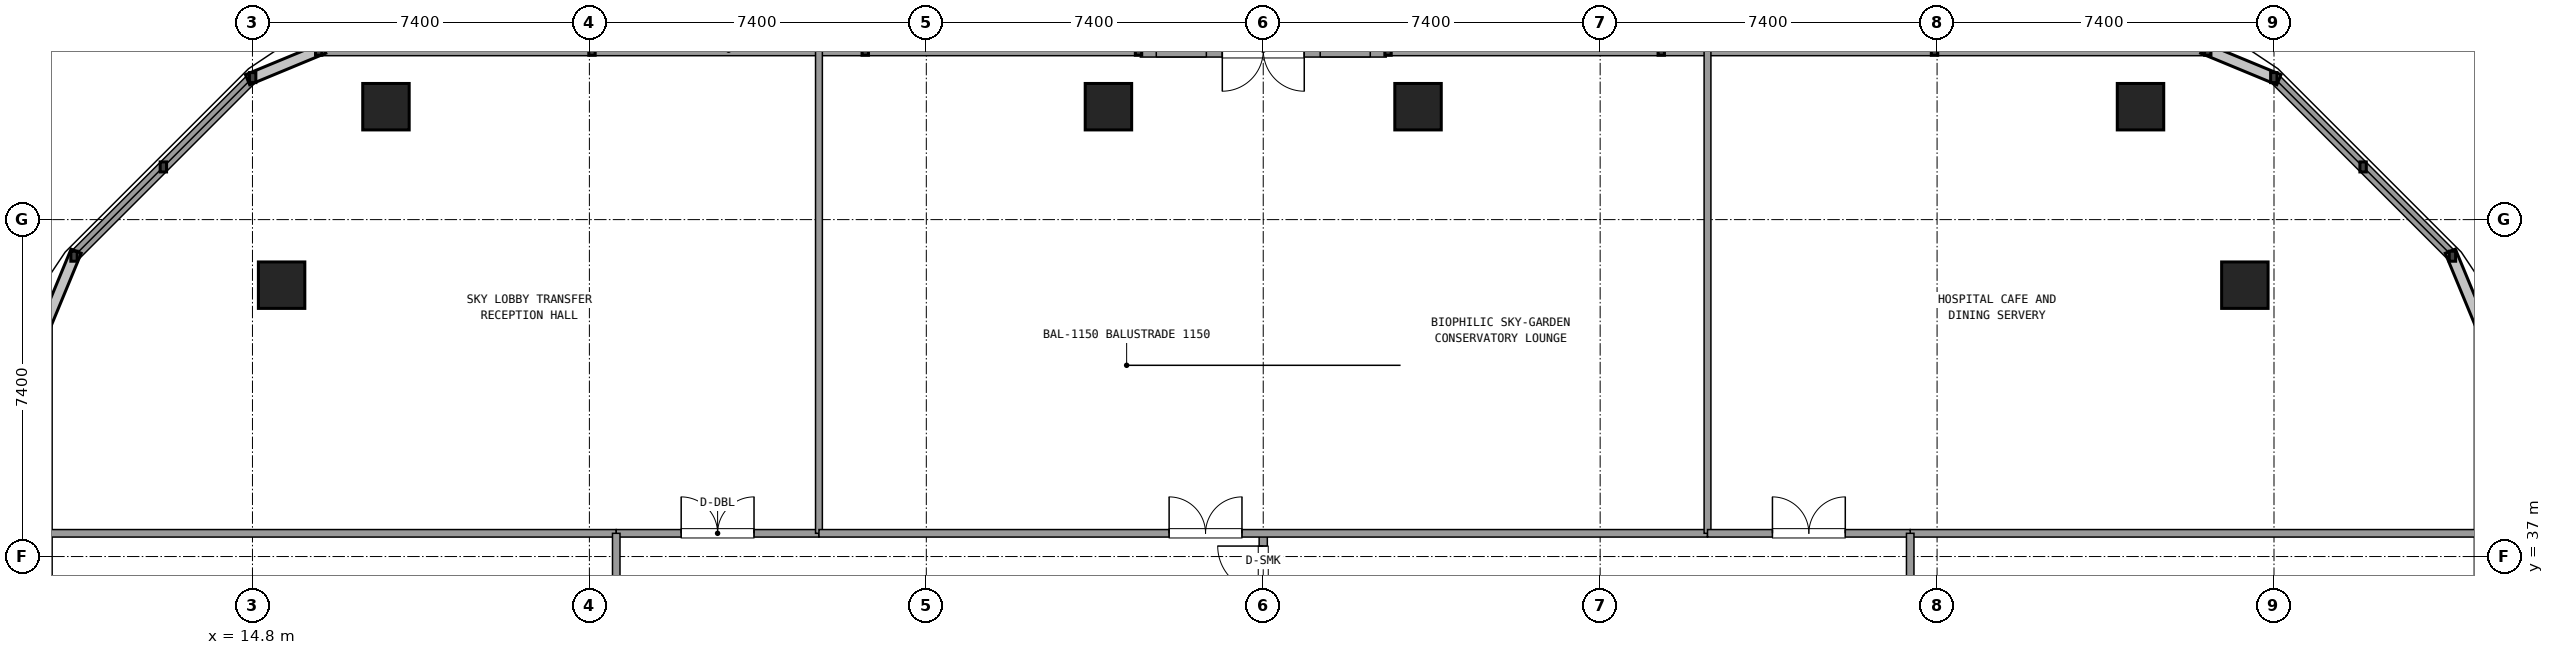
"""IFC4 building model, lengths in metres.
Left out: names, types, materials, properties, quantities, classifications, styles, units other than length and angle.
Written with IfcOpenShell. Run it as: python <this file> out.ifc"""

import sys

from ifc_helpers import new_model, si_unit, direction, frame, frame_2d, origin, origin_2d, place, context, subcontext, project, spatial, rectangle, extrude, element, fill, save


model = new_model("IFC4")
c1 = context("Model", 3, precision=1e-05, world=origin(), true_north=direction((0.0, 1.0)))
c2 = subcontext(c1, "Body", "Model", "MODEL_VIEW")
j1 = project(units=[si_unit("LENGTHUNIT", "METRE"), si_unit("PLANEANGLEUNIT", "RADIAN")], contexts=[c1])
p1 = place(None, origin())
s1 = spatial("IfcSite", under=j1, at=p1, CompositionType="ELEMENT")
p2 = place(p1, origin())
s2 = spatial("IfcBuilding", under=s1, at=p2, CompositionType="ELEMENT")
p3 = place(p2, frame((0.0, 0.0, 75.42)))
s3 = spatial("IfcBuildingStorey", under=s2, at=p3, CompositionType="ELEMENT", Elevation=75.42)
for number, where, z_axis, x_axis in (
    (1, (58.56, 42.96, 0.0), (0.0, 0.0, 1.0), (1.0, 0.0, 0.0)),
    (2, (56.268, 46.88, 0.0), (0.0, 0.0, 1.0), (1.0, 0.0, 0.0)),
    (3, (40.4, 46.88, 0.0), (0.0, 0.0, 1.0), (1.0, 0.0, 0.0)),
    (4, (33.6, 46.88, 0.0), (0.0, 0.0, 1.0), (1.0, 0.0, 0.0)),
    (5, (17.732, 46.88, 0.0), (0.0, 0.0, 1.0), (1.0, 0.0, 0.0)),
    (6, (15.44, 42.96, 0.0), (0.0, 0.0, 1.0), (1.0, 0.0, 0.0)),
):
    element("IfcColumn", number, at=place(p3, frame(where, z_axis=z_axis, x_axis=x_axis)), inside=s3, PredefinedType="COLUMN", context=c2, shape_type="SweptSolid", body=[
        extrude(rectangle(XDim=1.02, YDim=1.02, at=origin_2d()), origin(), (0.0, 0.0, 1.0), 5.76),
    ])
p4 = place(p3, frame((63.72, 28.639, 0.0), z_axis=(0.0, 0.0, 1.0), x_axis=(0.0, 1.0, 0.0)))
e7 = element("IfcWall", 7, at=p4, inside=s3, PredefinedType="SOLIDWALL", context=c2, shape_type="SweptSolid", body=[
    extrude(rectangle(XDim=13.506, YDim=0.24, at=frame_2d((6.753, 0.0))), origin(), (0.0, 0.0, 1.0), 0.85),
])
p5 = place(p3, frame((63.119, 43.596, 0.0), z_axis=(0.0, 0.0, 1.0), x_axis=(-0.707084777957, 0.707128783731, 0.0)))
e8 = element("IfcWall", 8, at=p5, inside=s3, PredefinedType="SOLIDWALL", context=c2, shape_type="SweptSolid", body=[
    extrude(rectangle(XDim=5.548, YDim=0.24, at=frame_2d((2.774, 0.0))), origin(), (0.0, 0.0, 1.0), 0.85),
])
p6 = place(p3, frame((39.701, 48.12, 0.0), z_axis=(0.0, 0.0, 1.0), x_axis=(-1.0, 0.0, 0.0)))
e9 = element("IfcWall", 9, at=p6, inside=s3, PredefinedType="SOLIDWALL", context=c2, shape_type="SweptSolid", body=[
    extrude(rectangle(XDim=5.4, YDim=0.3, at=frame_2d((2.7, 0.0))), origin(), (0.0, 0.0, 1.0), 4.83),
])
p7 = place(p6, frame((1.8, 0.0, 0.0)))
e10 = element("IfcOpeningElement", 10, at=p7, cuts=e9, PredefinedType="OPENING", context=c2, shape_type="SweptSolid", body=[
    extrude(rectangle(XDim=1.8, YDim=2.25, at=frame_2d((0.9, 1.125))), frame((0.0, 0.16, 0.0), z_axis=(0.0, -1.0, 0.0), x_axis=(1.0, 0.0, 0.0)), (0.0, 0.0, 1.0), 0.32),
])
p8 = place(p6, frame((0.35, 0.0, 0.4)))
e11 = element("IfcOpeningElement", 11, at=p8, cuts=e9, PredefinedType="OPENING", context=c2, shape_type="SweptSolid", body=[
    extrude(rectangle(XDim=1.1, YDim=1.8, at=frame_2d((0.55, 0.9))), frame((0.0, 0.16, 0.0), z_axis=(0.0, -1.0, 0.0), x_axis=(1.0, 0.0, 0.0)), (0.0, 0.0, 1.0), 0.32),
])
p9 = place(p6, frame((3.95, 0.0, 0.4)))
e12 = element("IfcOpeningElement", 12, at=p9, cuts=e9, PredefinedType="OPENING", context=c2, shape_type="SweptSolid", body=[
    extrude(rectangle(XDim=1.1, YDim=1.8, at=frame_2d((0.55, 0.9))), frame((0.0, 0.16, 0.0), z_axis=(0.0, -1.0, 0.0), x_axis=(1.0, 0.0, 0.0)), (0.0, 0.0, 1.0), 0.32),
])
p10 = place(p3, frame((57.745, 48.12, 0.0), z_axis=(0.0, 0.0, 1.0), x_axis=(-1.0, 0.0, 0.0)))
e13 = element("IfcWall", 13, at=p10, inside=s3, PredefinedType="SOLIDWALL", context=c2, shape_type="SweptSolid", body=[
    extrude(rectangle(XDim=18.004, YDim=0.24, at=frame_2d((9.002, 0.0))), origin(), (0.0, 0.0, 1.0), 0.85),
])
p11 = place(p3, frame((34.261, 48.12, 0.0), z_axis=(0.0, 0.0, 1.0), x_axis=(-1.0, 0.0, 0.0)))
e14 = element("IfcWall", 14, at=p11, inside=s3, PredefinedType="SOLIDWALL", context=c2, shape_type="SweptSolid", body=[
    extrude(rectangle(XDim=18.006, YDim=0.24, at=frame_2d((9.003, 0.0))), origin(), (0.0, 0.0, 1.0), 0.85),
])
p12 = place(p3, frame((14.804, 47.519, 0.0), z_axis=(0.0, 0.0, 1.0), x_axis=(-0.707084777957, -0.707128783731, 0.0)))
e15 = element("IfcWall", 15, at=p12, inside=s3, PredefinedType="SOLIDWALL", context=c2, shape_type="SweptSolid", body=[
    extrude(rectangle(XDim=5.548, YDim=0.24, at=frame_2d((2.774, 0.0))), origin(), (0.0, 0.0, 1.0), 0.85),
])
p13 = place(p3, frame((10.28, 42.145, 0.0), z_axis=(0.0, 0.0, 1.0), x_axis=(0.0, -1.0, 0.0)))
e16 = element("IfcWall", 16, at=p13, inside=s3, PredefinedType="SOLIDWALL", context=c2, shape_type="SweptSolid", body=[
    extrude(rectangle(XDim=13.504, YDim=0.24, at=frame_2d((6.752, 0.0))), origin(), (0.0, 0.0, 1.0), 0.85),
])
p14 = place(p3, frame((37.0, 34.95, 0.0), z_axis=(0.0, 0.0, 1.0), x_axis=(0.0, 1.0, 0.0)))
e17 = element("IfcWall", 17, at=p14, inside=s3, PredefinedType="PARTITIONING", context=c2, shape_type="SweptSolid", body=[
    extrude(rectangle(XDim=2.56, YDim=0.18, at=frame_2d((1.28, 0.0))), origin(), (0.0, 0.0, 1.0), 4.77),
])
p15 = place(p14, frame((0.28, 0.0, 0.0)))
e18 = element("IfcOpeningElement", 18, at=p15, cuts=e17, PredefinedType="OPENING", context=c2, shape_type="SweptSolid", body=[
    extrude(rectangle(XDim=2.0, YDim=2.2, at=frame_2d((1.0, 1.1))), frame((0.0, 0.1, 0.0), z_axis=(0.0, -1.0, 0.0), x_axis=(1.0, 0.0, 0.0)), (0.0, 0.0, 1.0), 0.2),
])
for number, where, z_axis, x_axis in (
    (19, (10.3, 37.51, 0.0), (0.0, 0.0, 1.0), (1.0, 0.0, 0.0)),
    (20, (51.21, 37.51, 0.0), (0.0, 0.0, 1.0), (1.0, 0.0, 0.0)),
):
    element("IfcWall", number, at=place(p3, frame(where, z_axis=z_axis, x_axis=x_axis)), inside=s3, PredefinedType="PARTITIONING", context=c2, shape_type="SweptSolid", body=[
        extrude(rectangle(XDim=12.49, YDim=0.165, at=frame_2d((6.245, 0.0))), origin(), (0.0, 0.0, 1.0), 4.77),
    ])
p16 = place(p3, frame((22.79, 37.51, 0.0), z_axis=(0.0, 0.0, 1.0), x_axis=(1.0, 0.0, 0.0)))
e21 = element("IfcWall", 21, at=p16, inside=s3, PredefinedType="PARTITIONING", context=c2, shape_type="SweptSolid", body=[
    extrude(rectangle(XDim=4.452, YDim=0.165, at=frame_2d((2.226, 0.0))), origin(), (0.0, 0.0, 1.0), 4.77),
])
p17 = place(p16, frame((1.426, 0.0, 0.0)))
e22 = element("IfcOpeningElement", 22, at=p17, cuts=e21, PredefinedType="OPENING", context=c2, shape_type="SweptSolid", body=[
    extrude(rectangle(XDim=1.6, YDim=2.2, at=frame_2d((0.8, 1.1))), frame((0.0, 0.093, 0.0), z_axis=(0.0, -1.0, 0.0), x_axis=(1.0, 0.0, 0.0)), (0.0, 0.0, 1.0), 0.185),
])
p18 = place(p3, frame((27.242, 37.51, 0.0), z_axis=(0.0, 0.0, 1.0), x_axis=(0.0, 1.0, 0.0)))
e23 = element("IfcWall", 23, at=p18, inside=s3, PredefinedType="PARTITIONING", context=c2, shape_type="SweptSolid", body=[
    extrude(rectangle(XDim=10.59, YDim=0.15, at=frame_2d((5.295, 0.0))), origin(), (0.0, 0.0, 1.0), 4.77),
])
p19 = place(p3, frame((27.242, 37.51, 0.0), z_axis=(0.0, 0.0, 1.0), x_axis=(1.0, 0.0, 0.0)))
e24 = element("IfcWall", 24, at=p19, inside=s3, PredefinedType="PARTITIONING", context=c2, shape_type="SweptSolid", body=[
    extrude(rectangle(XDim=19.516, YDim=0.165, at=frame_2d((9.758, 0.0))), origin(), (0.0, 0.0, 1.0), 4.77),
])
p20 = place(p19, frame((7.691, 0.0, 0.0)))
e25 = element("IfcOpeningElement", 25, at=p20, cuts=e24, PredefinedType="OPENING", context=c2, shape_type="SweptSolid", body=[
    extrude(rectangle(XDim=1.6, YDim=2.2, at=frame_2d((0.8, 1.1))), frame((0.0, 0.093, 0.0), z_axis=(0.0, -1.0, 0.0), x_axis=(1.0, 0.0, 0.0)), (0.0, 0.0, 1.0), 0.185),
])
p21 = place(p3, frame((46.758, 37.51, 0.0), z_axis=(0.0, 0.0, 1.0), x_axis=(0.0, 1.0, 0.0)))
e26 = element("IfcWall", 26, at=p21, inside=s3, PredefinedType="PARTITIONING", context=c2, shape_type="SweptSolid", body=[
    extrude(rectangle(XDim=10.59, YDim=0.15, at=frame_2d((5.295, 0.0))), origin(), (0.0, 0.0, 1.0), 4.77),
])
p22 = place(p3, frame((46.758, 37.51, 0.0), z_axis=(0.0, 0.0, 1.0), x_axis=(1.0, 0.0, 0.0)))
e27 = element("IfcWall", 27, at=p22, inside=s3, PredefinedType="PARTITIONING", context=c2, shape_type="SweptSolid", body=[
    extrude(rectangle(XDim=4.452, YDim=0.165, at=frame_2d((2.226, 0.0))), origin(), (0.0, 0.0, 1.0), 4.77),
])
p23 = place(p22, frame((1.426, 0.0, 0.0)))
e28 = element("IfcOpeningElement", 28, at=p23, cuts=e27, PredefinedType="OPENING", context=c2, shape_type="SweptSolid", body=[
    extrude(rectangle(XDim=1.6, YDim=2.2, at=frame_2d((0.8, 1.1))), frame((0.0, 0.093, 0.0), z_axis=(0.0, -1.0, 0.0), x_axis=(1.0, 0.0, 0.0)), (0.0, 0.0, 1.0), 0.185),
])
p24 = place(p3, frame((22.79, 30.544, 0.0), z_axis=(0.0, 0.0, 1.0), x_axis=(0.0, 1.0, 0.0)))
e29 = element("IfcWall", 29, at=p24, inside=s3, PredefinedType="PARTITIONING", context=c2, shape_type="SweptSolid", body=[
    extrude(rectangle(XDim=6.966, YDim=0.165, at=frame_2d((3.483, 0.0))), origin(), (0.0, 0.0, 1.0), 4.77),
])
p25 = place(p24, frame((2.683, 0.0, 0.0)))
e30 = element("IfcOpeningElement", 30, at=p25, cuts=e29, PredefinedType="OPENING", context=c2, shape_type="SweptSolid", body=[
    extrude(rectangle(XDim=1.6, YDim=2.2, at=frame_2d((0.8, 1.1))), frame((0.0, 0.093, 0.0), z_axis=(0.0, -1.0, 0.0), x_axis=(1.0, 0.0, 0.0)), (0.0, 0.0, 1.0), 0.185),
])
p26 = place(p3, frame((51.21, 30.312, 0.0), z_axis=(0.0, 0.0, 1.0), x_axis=(0.0, 1.0, 0.0)))
e31 = element("IfcWall", 31, at=p26, inside=s3, PredefinedType="PARTITIONING", context=c2, shape_type="SweptSolid", body=[
    extrude(rectangle(XDim=7.198, YDim=0.165, at=frame_2d((3.599, 0.0))), origin(), (0.0, 0.0, 1.0), 4.77),
])
p27 = place(p26, frame((2.799, 0.0, 0.0)))
e32 = element("IfcOpeningElement", 32, at=p27, cuts=e31, PredefinedType="OPENING", context=c2, shape_type="SweptSolid", body=[
    extrude(rectangle(XDim=1.6, YDim=2.2, at=frame_2d((0.8, 1.1))), frame((0.0, 0.093, 0.0), z_axis=(0.0, -1.0, 0.0), x_axis=(1.0, 0.0, 0.0)), (0.0, 0.0, 1.0), 0.185),
])
p28 = place(p15, origin())
e33 = element("IfcDoor", 33, at=p28, inside=s3, OperationType="DOUBLE_DOOR_SINGLE_SWING", PredefinedType="DOOR", context=c2, shape_type="SweptSolid", body=[
    extrude(rectangle(XDim=2.0, YDim=2.2, at=frame_2d((1.0, 1.1))), frame((0.0, 0.025, 0.0), z_axis=(0.0, -1.0, 0.0), x_axis=(1.0, 0.0, 0.0)), (0.0, 0.0, 1.0), 0.05),
])
fill(e18, e33)
p29 = place(p17, origin())
e34 = element("IfcDoor", 34, at=p29, inside=s3, OperationType="DOUBLE_DOOR_SINGLE_SWING", PredefinedType="DOOR", context=c2, shape_type="SweptSolid", body=[
    extrude(rectangle(XDim=1.6, YDim=2.2, at=frame_2d((0.8, 1.1))), frame((0.0, 0.025, 0.0), z_axis=(0.0, -1.0, 0.0), x_axis=(1.0, 0.0, 0.0)), (0.0, 0.0, 1.0), 0.05),
])
fill(e22, e34)
p30 = place(p20, origin())
e35 = element("IfcDoor", 35, at=p30, inside=s3, OperationType="DOUBLE_DOOR_SINGLE_SWING", PredefinedType="DOOR", context=c2, shape_type="SweptSolid", body=[
    extrude(rectangle(XDim=1.6, YDim=2.2, at=frame_2d((0.8, 1.1))), frame((0.0, 0.025, 0.0), z_axis=(0.0, -1.0, 0.0), x_axis=(1.0, 0.0, 0.0)), (0.0, 0.0, 1.0), 0.05),
])
fill(e25, e35)
p31 = place(p23, origin())
e36 = element("IfcDoor", 36, at=p31, inside=s3, OperationType="DOUBLE_DOOR_SINGLE_SWING", PredefinedType="DOOR", context=c2, shape_type="SweptSolid", body=[
    extrude(rectangle(XDim=1.6, YDim=2.2, at=frame_2d((0.8, 1.1))), frame((0.0, 0.025, 0.0), z_axis=(0.0, -1.0, 0.0), x_axis=(1.0, 0.0, 0.0)), (0.0, 0.0, 1.0), 0.05),
])
fill(e28, e36)
save(model, sys.argv[1])
